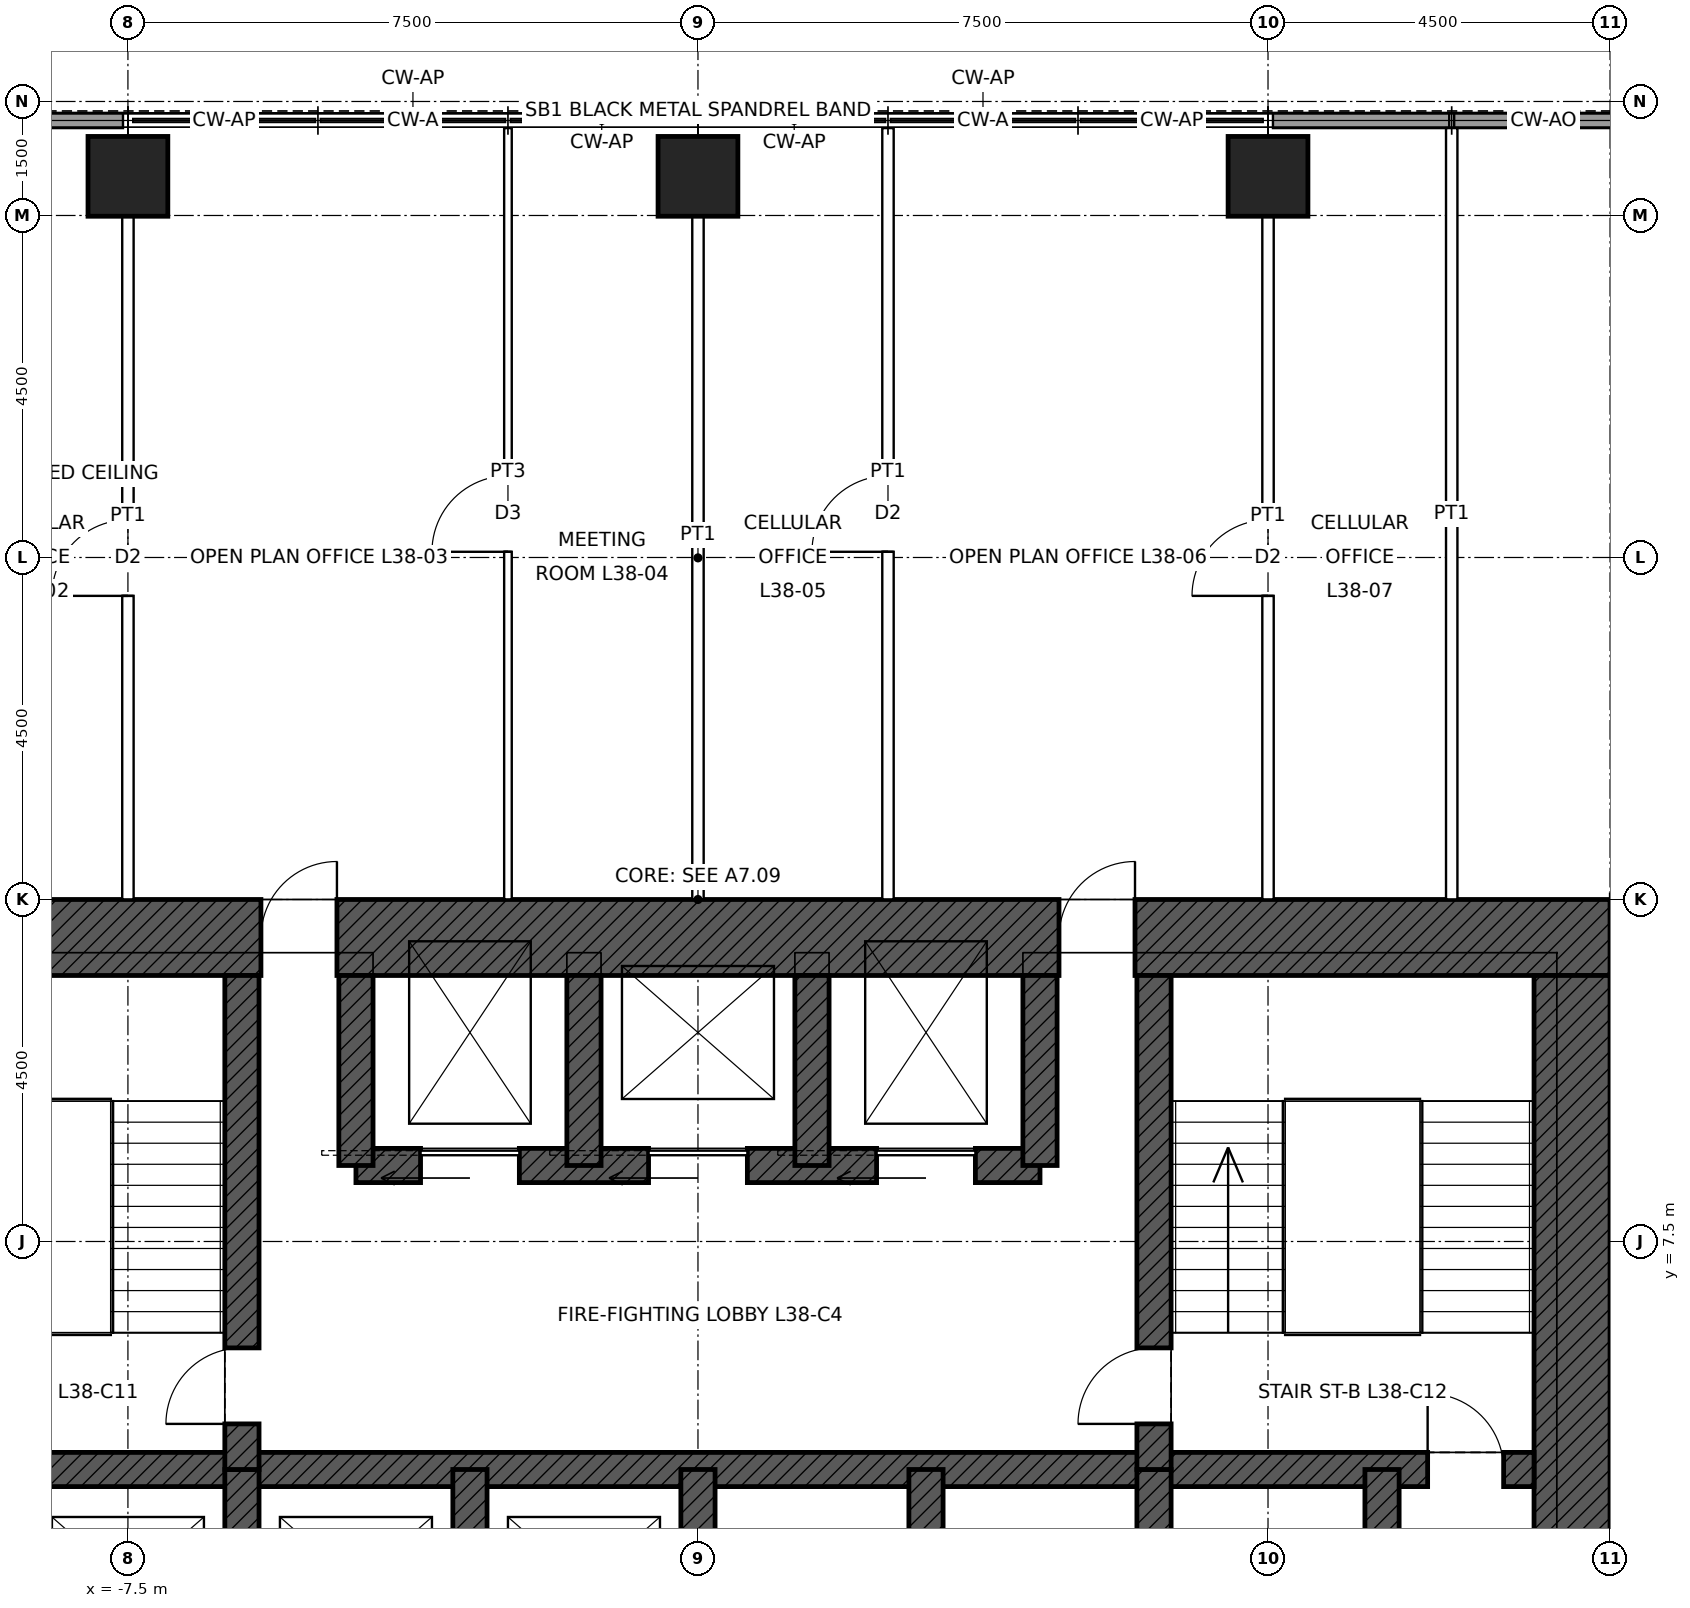
"""IFC4 building model, lengths in metres.
Left out: names, types, materials, properties, quantities, classifications, styles, units other than length and angle.
Written with IfcOpenShell. Run it as: python <this file> out.ifc"""

import sys

from ifc_helpers import new_model, si_unit, direction, frame, frame_2d, origin, origin_2d, place, context, subcontext, project, spatial, rectangle, hollow_rectangle, extrude, element, fill, save


model = new_model("IFC4")
c1 = context("Model", 3, precision=1e-05, world=origin(), true_north=direction((0.0, 1.0)))
c2 = subcontext(c1, "Body", "Model", "MODEL_VIEW")
j1 = project(units=[si_unit("LENGTHUNIT", "METRE"), si_unit("PLANEANGLEUNIT", "RADIAN")], contexts=[c1])
p1 = place(None, origin())
s1 = spatial("IfcSite", under=j1, at=p1, CompositionType="ELEMENT")
p2 = place(p1, origin())
s2 = spatial("IfcBuilding", under=s1, at=p2, CompositionType="ELEMENT")
p3 = place(p2, frame((0.0, 0.0, 185.9)))
s3 = spatial("IfcBuildingStorey", under=s2, at=p3, CompositionType="ELEMENT", Elevation=185.9)
for number, where, z_axis, x_axis in (
    (1, (-7.5, 21.515, 0.0), (0.0, 0.0, 1.0), (1.0, 0.0, 0.0)),
    (2, (0.0, 21.515, 0.0), (0.0, 0.0, 1.0), (1.0, 0.0, 0.0)),
    (3, (7.5, 21.515, 0.0), (0.0, 0.0, 1.0), (1.0, 0.0, 0.0)),
):
    element("IfcColumn", number, at=place(p3, frame(where, z_axis=z_axis, x_axis=x_axis)), inside=s3, PredefinedType="COLUMN", context=c2, shape_type="SweptSolid", body=[
        extrude(hollow_rectangle(XDim=1.05, YDim=1.05, WallThickness=0.07, at=origin_2d()), origin(), (0.0, 0.0, 1.0), 4.0),
    ])
p4 = place(p3, frame((-12.0, 11.5, 0.0), z_axis=(0.0, 0.0, 1.0), x_axis=(1.0, 0.0, 0.0)))
e4 = element("IfcWall", 4, at=p4, inside=s3, PredefinedType="SHEAR", context=c2, shape_type="SweptSolid", body=[
    extrude(rectangle(XDim=24.0, YDim=1.0, at=frame_2d((12.0, 0.0))), origin(), (0.0, 0.0, 1.0), 4.0),
])
p5 = place(p4, frame((6.25, 0.0, 0.0)))
e5 = element("IfcOpeningElement", 5, at=p5, cuts=e4, PredefinedType="OPENING", context=c2, shape_type="SweptSolid", body=[
    extrude(rectangle(XDim=1.0, YDim=2.4, at=frame_2d((0.5, 1.2))), frame((0.0, 0.51, 0.0), z_axis=(0.0, -1.0, 0.0), x_axis=(1.0, 0.0, 0.0)), (0.0, 0.0, 1.0), 1.02),
])
p6 = place(p4, frame((16.75, 0.0, 0.0)))
e6 = element("IfcOpeningElement", 6, at=p6, cuts=e4, PredefinedType="OPENING", context=c2, shape_type="SweptSolid", body=[
    extrude(rectangle(XDim=1.0, YDim=2.4, at=frame_2d((0.5, 1.2))), frame((0.0, 0.51, 0.0), z_axis=(0.0, -1.0, 0.0), x_axis=(1.0, 0.0, 0.0)), (0.0, 0.0, 1.0), 1.02),
])
p7 = place(p3, frame((11.5, 11.0, 0.0), z_axis=(0.0, 0.0, 1.0), x_axis=(0.0, -1.0, 0.0)))
e7 = element("IfcWall", 7, at=p7, inside=s3, PredefinedType="SHEAR", context=c2, shape_type="SweptSolid", body=[
    extrude(rectangle(XDim=22.0, YDim=1.0, at=frame_2d((11.0, 0.0))), origin(), (0.0, 0.0, 1.0), 4.0),
])
p8 = place(p7, frame((10.5, 0.0, 0.0)))
e8 = element("IfcOpeningElement", 8, at=p8, cuts=e7, PredefinedType="OPENING", context=c2, shape_type="SweptSolid", body=[
    extrude(rectangle(XDim=1.0, YDim=2.4, at=frame_2d((0.5, 1.2))), frame((0.0, 0.51, 0.0), z_axis=(0.0, -1.0, 0.0), x_axis=(1.0, 0.0, 0.0)), (0.0, 0.0, 1.0), 1.02),
])
p9 = place(p3, frame((-11.0, 4.5, 0.0), z_axis=(0.0, 0.0, 1.0), x_axis=(1.0, 0.0, 0.0)))
e9 = element("IfcWall", 9, at=p9, inside=s3, PredefinedType="SHEAR", context=c2, shape_type="SweptSolid", body=[
    extrude(rectangle(XDim=22.0, YDim=0.45, at=frame_2d((11.0, 0.0))), origin(), (0.0, 0.0, 1.0), 4.0),
])
p10 = place(p9, frame((0.4, 0.0, 0.0)))
e10 = element("IfcOpeningElement", 10, at=p10, cuts=e9, PredefinedType="OPENING", context=c2, shape_type="SweptSolid", body=[
    extrude(rectangle(XDim=1.0, YDim=2.1, at=frame_2d((0.5, 1.05))), frame((0.0, 0.235, 0.0), z_axis=(0.0, -1.0, 0.0), x_axis=(1.0, 0.0, 0.0)), (0.0, 0.0, 1.0), 0.47),
])
p11 = place(p9, frame((20.6, 0.0, 0.0)))
e11 = element("IfcOpeningElement", 11, at=p11, cuts=e9, PredefinedType="OPENING", context=c2, shape_type="SweptSolid", body=[
    extrude(rectangle(XDim=1.0, YDim=2.1, at=frame_2d((0.5, 1.05))), frame((0.0, 0.235, 0.0), z_axis=(0.0, -1.0, 0.0), x_axis=(1.0, 0.0, 0.0)), (0.0, 0.0, 1.0), 0.47),
])
p12 = place(p3, frame((-4.5, 8.5, 0.0), z_axis=(0.0, 0.0, 1.0), x_axis=(1.0, 0.0, 0.0)))
e12 = element("IfcWall", 12, at=p12, inside=s3, PredefinedType="SHEAR", context=c2, shape_type="SweptSolid", body=[
    extrude(rectangle(XDim=9.0, YDim=0.45, at=frame_2d((4.5, 0.0))), origin(), (0.0, 0.0, 1.0), 4.0),
])
p13 = place(p12, frame((0.85, 0.0, 0.0)))
e13 = element("IfcOpeningElement", 13, at=p13, cuts=e12, PredefinedType="OPENING", context=c2, shape_type="SweptSolid", body=[
    extrude(rectangle(XDim=1.3, YDim=2.4, at=frame_2d((0.65, 1.2))), frame((0.0, 0.235, 0.0), z_axis=(0.0, -1.0, 0.0), x_axis=(1.0, 0.0, 0.0)), (0.0, 0.0, 1.0), 0.47),
])
p14 = place(p12, frame((6.85, 0.0, 0.0)))
e14 = element("IfcOpeningElement", 14, at=p14, cuts=e12, PredefinedType="OPENING", context=c2, shape_type="SweptSolid", body=[
    extrude(rectangle(XDim=1.3, YDim=2.4, at=frame_2d((0.65, 1.2))), frame((0.0, 0.235, 0.0), z_axis=(0.0, -1.0, 0.0), x_axis=(1.0, 0.0, 0.0)), (0.0, 0.0, 1.0), 0.47),
])
p15 = place(p12, frame((3.85, 0.0, 0.0)))
e15 = element("IfcOpeningElement", 15, at=p15, cuts=e12, PredefinedType="OPENING", context=c2, shape_type="SweptSolid", body=[
    extrude(rectangle(XDim=1.3, YDim=2.4, at=frame_2d((0.65, 1.2))), frame((0.0, 0.235, 0.0), z_axis=(0.0, -1.0, 0.0), x_axis=(1.0, 0.0, 0.0)), (0.0, 0.0, 1.0), 0.47),
])
for number, where, z_axis, x_axis in (
    (16, (9.0, 1.5, 0.0), (0.0, 0.0, 1.0), (0.0, 1.0, 0.0)),
    (17, (-6.0, 1.5, 0.0), (0.0, 0.0, 1.0), (0.0, 1.0, 0.0)),
    (18, (-3.0, 1.5, 0.0), (0.0, 0.0, 1.0), (0.0, 1.0, 0.0)),
    (19, (0.0, 1.5, 0.0), (0.0, 0.0, 1.0), (0.0, 1.0, 0.0)),
    (20, (3.0, 1.5, 0.0), (0.0, 0.0, 1.0), (0.0, 1.0, 0.0)),
    (21, (6.0, 1.5, 0.0), (0.0, 0.0, 1.0), (0.0, 1.0, 0.0)),
):
    element("IfcWall", number, at=place(p3, frame(where, z_axis=z_axis, x_axis=x_axis)), inside=s3, PredefinedType="SHEAR", context=c2, shape_type="SweptSolid", body=[
        extrude(rectangle(XDim=3.0, YDim=0.45, at=frame_2d((1.5, 0.0))), origin(), (0.0, 0.0, 1.0), 4.0),
    ])
p16 = place(p3, frame((-6.0, 4.5, 0.0), z_axis=(0.0, 0.0, 1.0), x_axis=(0.0, 1.0, 0.0)))
e22 = element("IfcWall", 22, at=p16, inside=s3, PredefinedType="SHEAR", context=c2, shape_type="SweptSolid", body=[
    extrude(rectangle(XDim=6.5, YDim=0.45, at=frame_2d((3.25, 0.0))), origin(), (0.0, 0.0, 1.0), 4.0),
])
p17 = place(p16, frame((0.6, 0.0, 0.0)))
e23 = element("IfcOpeningElement", 23, at=p17, cuts=e22, PredefinedType="OPENING", context=c2, shape_type="SweptSolid", body=[
    extrude(rectangle(XDim=1.0, YDim=2.1, at=frame_2d((0.5, 1.05))), frame((0.0, 0.235, 0.0), z_axis=(0.0, -1.0, 0.0), x_axis=(1.0, 0.0, 0.0)), (0.0, 0.0, 1.0), 0.47),
])
p18 = place(p3, frame((6.0, 4.5, 0.0), z_axis=(0.0, 0.0, 1.0), x_axis=(0.0, 1.0, 0.0)))
e24 = element("IfcWall", 24, at=p18, inside=s3, PredefinedType="SHEAR", context=c2, shape_type="SweptSolid", body=[
    extrude(rectangle(XDim=6.5, YDim=0.45, at=frame_2d((3.25, 0.0))), origin(), (0.0, 0.0, 1.0), 4.0),
])
p19 = place(p18, frame((0.6, 0.0, 0.0)))
e25 = element("IfcOpeningElement", 25, at=p19, cuts=e24, PredefinedType="OPENING", context=c2, shape_type="SweptSolid", body=[
    extrude(rectangle(XDim=1.0, YDim=2.1, at=frame_2d((0.5, 1.05))), frame((0.0, 0.235, 0.0), z_axis=(0.0, -1.0, 0.0), x_axis=(1.0, 0.0, 0.0)), (0.0, 0.0, 1.0), 0.47),
])
for number, where, z_axis, x_axis in (
    (26, (-4.5, 8.5, 0.0), (0.0, 0.0, 1.0), (0.0, 1.0, 0.0)),
    (27, (4.5, 8.5, 0.0), (0.0, 0.0, 1.0), (0.0, 1.0, 0.0)),
    (28, (-1.5, 8.5, 0.0), (0.0, 0.0, 1.0), (0.0, 1.0, 0.0)),
    (29, (1.5, 8.5, 0.0), (0.0, 0.0, 1.0), (0.0, 1.0, 0.0)),
):
    element("IfcWall", number, at=place(p3, frame(where, z_axis=z_axis, x_axis=x_axis)), inside=s3, PredefinedType="SHEAR", context=c2, shape_type="SweptSolid", body=[
        extrude(rectangle(XDim=2.5, YDim=0.45, at=frame_2d((1.25, 0.0))), origin(), (0.0, 0.0, 1.0), 4.0),
    ])
for number, where, z_axis, x_axis in (
    (30, (-9.884, 22.25, 0.0), (0.0, 0.0, 1.0), (1.0, 0.0, 0.0)),
    (31, (7.565, 22.25, 0.0), (0.0, 0.0, 1.0), (1.0, 0.0, 0.0)),
):
    element("IfcWall", number, at=place(p3, frame(where, z_axis=z_axis, x_axis=x_axis)), inside=s3, PredefinedType="SOLIDWALL", context=c2, shape_type="SweptSolid", body=[
        extrude(rectangle(XDim=2.319, YDim=0.2, at=frame_2d((1.16, 0.0))), origin(), (0.0, 0.0, 1.0), 3.85),
    ])
p20 = place(p3, frame((9.949, 22.25, 0.0), z_axis=(0.0, 0.0, 1.0), x_axis=(1.0, 0.0, 0.0)))
e32 = element("IfcWall", 32, at=p20, inside=s3, PredefinedType="SOLIDWALL", context=c2, shape_type="SweptSolid", body=[
    extrude(rectangle(XDim=2.352, YDim=0.2, at=frame_2d((1.176, 0.0))), origin(), (0.0, 0.0, 1.0), 3.85),
])
p21 = place(p3, frame((-7.5, 12.0, 0.0), z_axis=(0.0, 0.0, 1.0), x_axis=(0.0, 1.0, 0.0)))
e33 = element("IfcWall", 33, at=p21, inside=s3, PredefinedType="PARTITIONING", context=c2, shape_type="SweptSolid", body=[
    extrude(rectangle(XDim=8.99, YDim=0.15, at=frame_2d((4.495, 0.0))), origin(), (0.0, 0.0, 1.0), 3.238),
])
p22 = place(p21, frame((3.995, 0.0, 0.0)))
e34 = element("IfcOpeningElement", 34, at=p22, cuts=e33, PredefinedType="OPENING", context=c2, shape_type="SweptSolid", body=[
    extrude(rectangle(XDim=1.0, YDim=2.1, at=frame_2d((0.5, 1.05))), frame((0.0, 0.085, 0.0), z_axis=(0.0, -1.0, 0.0), x_axis=(1.0, 0.0, 0.0)), (0.0, 0.0, 1.0), 0.17),
])
p23 = place(p3, frame((-2.5, 12.0, 0.0), z_axis=(0.0, 0.0, 1.0), x_axis=(0.0, 1.0, 0.0)))
e35 = element("IfcWall", 35, at=p23, inside=s3, PredefinedType="PARTITIONING", context=c2, shape_type="SweptSolid", body=[
    extrude(rectangle(XDim=10.15, YDim=0.1, at=frame_2d((5.075, 0.0))), origin(), (0.0, 0.0, 1.0), 3.85),
])
p24 = place(p23, frame((4.575, 0.0, 0.0)))
e36 = element("IfcOpeningElement", 36, at=p24, cuts=e35, PredefinedType="OPENING", context=c2, shape_type="SweptSolid", body=[
    extrude(rectangle(XDim=1.0, YDim=2.1, at=frame_2d((0.5, 1.05))), frame((0.0, 0.06, 0.0), z_axis=(0.0, -1.0, 0.0), x_axis=(1.0, 0.0, 0.0)), (0.0, 0.0, 1.0), 0.12),
])
p25 = place(p3, frame((0.0, 12.0, 0.0), z_axis=(0.0, 0.0, 1.0), x_axis=(0.0, 1.0, 0.0)))
e37 = element("IfcWall", 37, at=p25, inside=s3, PredefinedType="PARTITIONING", context=c2, shape_type="SweptSolid", body=[
    extrude(rectangle(XDim=8.99, YDim=0.15, at=frame_2d((4.495, 0.0))), origin(), (0.0, 0.0, 1.0), 3.238),
])
p26 = place(p3, frame((2.5, 12.0, 0.0), z_axis=(0.0, 0.0, 1.0), x_axis=(0.0, 1.0, 0.0)))
e38 = element("IfcWall", 38, at=p26, inside=s3, PredefinedType="PARTITIONING", context=c2, shape_type="SweptSolid", body=[
    extrude(rectangle(XDim=10.15, YDim=0.15, at=frame_2d((5.075, 0.0))), origin(), (0.0, 0.0, 1.0), 3.85),
])
p27 = place(p26, frame((4.575, 0.0, 0.0)))
e39 = element("IfcOpeningElement", 39, at=p27, cuts=e38, PredefinedType="OPENING", context=c2, shape_type="SweptSolid", body=[
    extrude(rectangle(XDim=1.0, YDim=2.1, at=frame_2d((0.5, 1.05))), frame((0.0, 0.085, 0.0), z_axis=(0.0, -1.0, 0.0), x_axis=(1.0, 0.0, 0.0)), (0.0, 0.0, 1.0), 0.17),
])
p28 = place(p3, frame((7.5, 12.0, 0.0), z_axis=(0.0, 0.0, 1.0), x_axis=(0.0, 1.0, 0.0)))
e40 = element("IfcWall", 40, at=p28, inside=s3, PredefinedType="PARTITIONING", context=c2, shape_type="SweptSolid", body=[
    extrude(rectangle(XDim=8.99, YDim=0.15, at=frame_2d((4.495, 0.0))), origin(), (0.0, 0.0, 1.0), 3.238),
])
p29 = place(p28, frame((3.995, 0.0, 0.0)))
e41 = element("IfcOpeningElement", 41, at=p29, cuts=e40, PredefinedType="OPENING", context=c2, shape_type="SweptSolid", body=[
    extrude(rectangle(XDim=1.0, YDim=2.1, at=frame_2d((0.5, 1.05))), frame((0.0, 0.085, 0.0), z_axis=(0.0, -1.0, 0.0), x_axis=(1.0, 0.0, 0.0)), (0.0, 0.0, 1.0), 0.17),
])
p30 = place(p3, frame((9.917, 12.0, 0.0), z_axis=(0.0, 0.0, 1.0), x_axis=(0.0, 1.0, 0.0)))
e42 = element("IfcWall", 42, at=p30, inside=s3, PredefinedType="PARTITIONING", context=c2, shape_type="SweptSolid", body=[
    extrude(rectangle(XDim=10.15, YDim=0.15, at=frame_2d((5.075, 0.0))), origin(), (0.0, 0.0, 1.0), 3.85),
])
p31 = place(p11, origin())
e43 = element("IfcDoor", 43, at=p31, inside=s3, OperationType="SINGLE_SWING_LEFT", PredefinedType="DOOR", context=c2, shape_type="SweptSolid", body=[
    extrude(rectangle(XDim=1.0, YDim=2.1, at=frame_2d((0.5, 1.05))), frame((0.0, 0.025, 0.0), z_axis=(0.0, -1.0, 0.0), x_axis=(1.0, 0.0, 0.0)), (0.0, 0.0, 1.0), 0.05),
])
fill(e11, e43)
p32 = place(p17, origin())
e44 = element("IfcDoor", 44, at=p32, inside=s3, OperationType="SINGLE_SWING_LEFT", PredefinedType="DOOR", context=c2, shape_type="SweptSolid", body=[
    extrude(rectangle(XDim=1.0, YDim=2.1, at=frame_2d((0.5, 1.05))), frame((0.0, 0.025, 0.0), z_axis=(0.0, -1.0, 0.0), x_axis=(1.0, 0.0, 0.0)), (0.0, 0.0, 1.0), 0.05),
])
fill(e23, e44)
p33 = place(p19, origin())
e45 = element("IfcDoor", 45, at=p33, inside=s3, OperationType="SINGLE_SWING_LEFT", PredefinedType="DOOR", context=c2, shape_type="SweptSolid", body=[
    extrude(rectangle(XDim=1.0, YDim=2.1, at=frame_2d((0.5, 1.05))), frame((0.0, 0.025, 0.0), z_axis=(0.0, -1.0, 0.0), x_axis=(1.0, 0.0, 0.0)), (0.0, 0.0, 1.0), 0.05),
])
fill(e25, e45)
p34 = place(p5, origin())
e46 = element("IfcDoor", 46, at=p34, inside=s3, OperationType="SINGLE_SWING_RIGHT", PredefinedType="DOOR", context=c2, shape_type="SweptSolid", body=[
    extrude(rectangle(XDim=1.0, YDim=2.4, at=frame_2d((0.5, 1.2))), frame((0.0, 0.485, 0.0), z_axis=(0.0, -1.0, 0.0), x_axis=(1.0, 0.0, 0.0)), (0.0, 0.0, 1.0), 0.05),
])
fill(e5, e46)
p35 = place(p6, origin())
e47 = element("IfcDoor", 47, at=p35, inside=s3, OperationType="SINGLE_SWING_RIGHT", PredefinedType="DOOR", context=c2, shape_type="SweptSolid", body=[
    extrude(rectangle(XDim=1.0, YDim=2.4, at=frame_2d((0.5, 1.2))), frame((0.0, 0.485, 0.0), z_axis=(0.0, -1.0, 0.0), x_axis=(1.0, 0.0, 0.0)), (0.0, 0.0, 1.0), 0.05),
])
fill(e6, e47)
p36 = place(p13, origin())
e48 = element("IfcDoor", 48, at=p36, inside=s3, OperationType="SLIDING_TO_LEFT", PredefinedType="DOOR", context=c2, shape_type="SweptSolid", body=[
    extrude(rectangle(XDim=1.3, YDim=2.4, at=frame_2d((0.65, 1.2))), frame((0.0, 0.025, 0.0), z_axis=(0.0, -1.0, 0.0), x_axis=(1.0, 0.0, 0.0)), (0.0, 0.0, 1.0), 0.05),
])
fill(e13, e48)
p37 = place(p14, origin())
e49 = element("IfcDoor", 49, at=p37, inside=s3, OperationType="SLIDING_TO_LEFT", PredefinedType="DOOR", context=c2, shape_type="SweptSolid", body=[
    extrude(rectangle(XDim=1.3, YDim=2.4, at=frame_2d((0.65, 1.2))), frame((0.0, 0.025, 0.0), z_axis=(0.0, -1.0, 0.0), x_axis=(1.0, 0.0, 0.0)), (0.0, 0.0, 1.0), 0.05),
])
fill(e14, e49)
p38 = place(p15, origin())
e50 = element("IfcDoor", 50, at=p38, inside=s3, OperationType="SLIDING_TO_LEFT", PredefinedType="DOOR", context=c2, shape_type="SweptSolid", body=[
    extrude(rectangle(XDim=1.3, YDim=2.4, at=frame_2d((0.65, 1.2))), frame((0.0, 0.025, 0.0), z_axis=(0.0, -1.0, 0.0), x_axis=(1.0, 0.0, 0.0)), (0.0, 0.0, 1.0), 0.05),
])
fill(e15, e50)
p39 = place(p22, origin())
e51 = element("IfcDoor", 51, at=p39, inside=s3, OperationType="SINGLE_SWING_LEFT", PredefinedType="DOOR", context=c2, shape_type="SweptSolid", body=[
    extrude(rectangle(XDim=1.0, YDim=2.1, at=frame_2d((0.5, 1.05))), frame((0.0, 0.025, 0.0), z_axis=(0.0, -1.0, 0.0), x_axis=(1.0, 0.0, 0.0)), (0.0, 0.0, 1.0), 0.05),
])
fill(e34, e51)
p40 = place(p24, origin())
e52 = element("IfcDoor", 52, at=p40, inside=s3, OperationType="SINGLE_SWING_LEFT", PredefinedType="DOOR", context=c2, shape_type="SweptSolid", body=[
    extrude(rectangle(XDim=1.0, YDim=2.1, at=frame_2d((0.5, 1.05))), frame((0.0, 0.025, 0.0), z_axis=(0.0, -1.0, 0.0), x_axis=(1.0, 0.0, 0.0)), (0.0, 0.0, 1.0), 0.05),
])
fill(e36, e52)
p41 = place(p27, origin())
e53 = element("IfcDoor", 53, at=p41, inside=s3, OperationType="SINGLE_SWING_LEFT", PredefinedType="DOOR", context=c2, shape_type="SweptSolid", body=[
    extrude(rectangle(XDim=1.0, YDim=2.1, at=frame_2d((0.5, 1.05))), frame((0.0, 0.025, 0.0), z_axis=(0.0, -1.0, 0.0), x_axis=(1.0, 0.0, 0.0)), (0.0, 0.0, 1.0), 0.05),
])
fill(e39, e53)
p42 = place(p29, origin())
e54 = element("IfcDoor", 54, at=p42, inside=s3, OperationType="SINGLE_SWING_LEFT", PredefinedType="DOOR", context=c2, shape_type="SweptSolid", body=[
    extrude(rectangle(XDim=1.0, YDim=2.1, at=frame_2d((0.5, 1.05))), frame((0.0, 0.025, 0.0), z_axis=(0.0, -1.0, 0.0), x_axis=(1.0, 0.0, 0.0)), (0.0, 0.0, 1.0), 0.05),
])
fill(e41, e54)
save(model, sys.argv[1])
